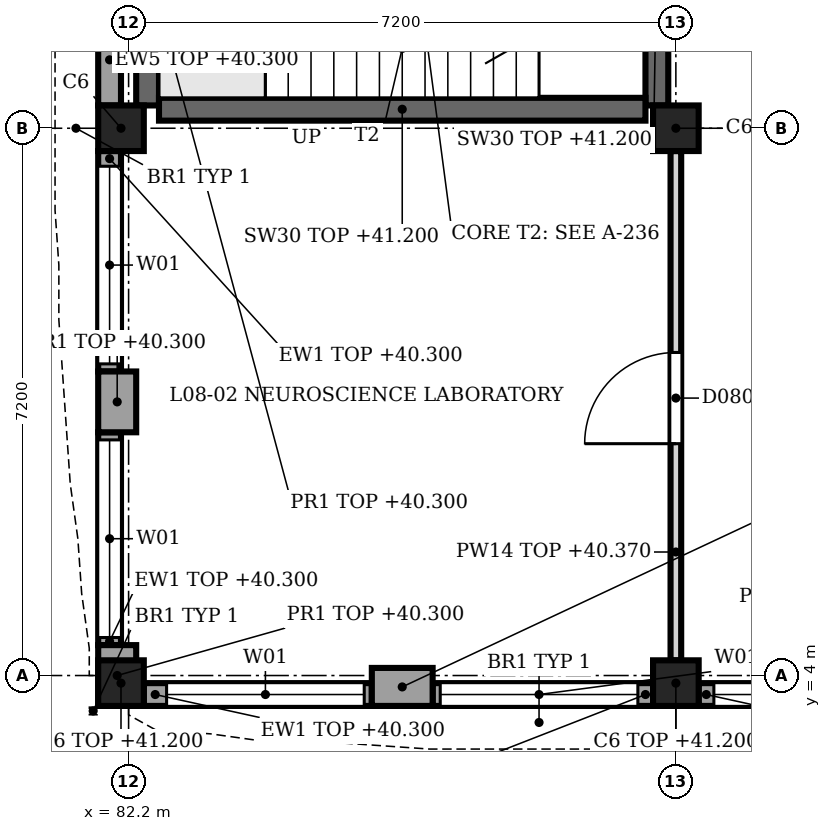
"""IFC4 building model, lengths in metres.
Left out: names, types, materials, properties, quantities, classifications, styles, units other than length and angle.
Written with IfcOpenShell. Run it as: python <this file> out.ifc"""

import sys

from ifc_helpers import new_model, si_unit, direction, frame, frame_2d, origin, origin_2d, place, context, subcontext, project, spatial, rectangle, extrude, element, fill, save


model = new_model("IFC4")
c1 = context("Model", 3, precision=1e-05, world=origin(), true_north=direction((0.0, 1.0)))
c2 = subcontext(c1, "Body", "Model", "MODEL_VIEW")
j1 = project(units=[si_unit("LENGTHUNIT", "METRE"), si_unit("PLANEANGLEUNIT", "RADIAN")], contexts=[c1])
p1 = place(None, origin())
s1 = spatial("IfcSite", under=j1, at=p1, CompositionType="ELEMENT")
p2 = place(p1, origin())
s2 = spatial("IfcBuilding", under=s1, at=p2, CompositionType="ELEMENT")
p3 = place(p2, frame((0.0, 0.0, 36.9)))
s3 = spatial("IfcBuildingStorey", under=s2, at=p3, CompositionType="ELEMENT", Elevation=36.9)
p4 = place(p3, frame((82.1, 3.9, 0.0), z_axis=(0.0, 0.0, 1.0), x_axis=(1.0, 0.0, 0.0)))
e1 = element("IfcColumn", 1, at=p4, inside=s3, PredefinedType="COLUMN", context=c2, shape_type="SweptSolid", body=[
    extrude(rectangle(XDim=0.6, YDim=0.6, at=origin_2d()), origin(), (0.0, 0.0, 1.0), 4.3),
])
p5 = place(p3, frame((82.1, 11.2, 0.0), z_axis=(0.0, 0.0, 1.0), x_axis=(1.0, 0.0, 0.0)))
e2 = element("IfcColumn", 2, at=p5, inside=s3, PredefinedType="COLUMN", context=c2, shape_type="SweptSolid", body=[
    extrude(rectangle(XDim=0.6, YDim=0.6, at=origin_2d()), origin(), (0.0, 0.0, 1.0), 4.5),
])
p6 = place(p3, frame((89.4, 3.9, 0.0), z_axis=(0.0, 0.0, 1.0), x_axis=(1.0, 0.0, 0.0)))
e3 = element("IfcColumn", 3, at=p6, inside=s3, PredefinedType="COLUMN", context=c2, shape_type="SweptSolid", body=[
    extrude(rectangle(XDim=0.6, YDim=0.6, at=origin_2d()), origin(), (0.0, 0.0, 1.0), 4.3),
])
p7 = place(p3, frame((89.4, 11.2, 0.0), z_axis=(0.0, 0.0, 1.0), x_axis=(1.0, 0.0, 0.0)))
e4 = element("IfcColumn", 4, at=p7, inside=s3, PredefinedType="COLUMN", context=c2, shape_type="SweptSolid", body=[
    extrude(rectangle(XDim=0.6, YDim=0.6, at=origin_2d()), origin(), (0.0, 0.0, 1.0), 4.5),
])
p8 = place(p3, frame((82.05, 3.6, 0.0), z_axis=(0.0, 0.0, 1.0), x_axis=(0.0, 1.0, 0.0)))
e5 = element("IfcWall", 5, at=p8, inside=s3, PredefinedType="SOLIDWALL", context=c2, shape_type="SweptSolid", body=[
    extrude(rectangle(XDim=0.8, YDim=0.5, at=frame_2d((0.4, 0.0))), origin(), (0.0, 0.0, 1.0), 3.4),
])
p9 = place(p3, frame((82.05, 7.2, 0.0), z_axis=(0.0, 0.0, 1.0), x_axis=(0.0, 1.0, 0.0)))
e6 = element("IfcWall", 6, at=p9, inside=s3, PredefinedType="SOLIDWALL", context=c2, shape_type="SweptSolid", body=[
    extrude(rectangle(XDim=0.8, YDim=0.5, at=frame_2d((0.4, 0.0))), origin(), (0.0, 0.0, 1.0), 3.4),
])
p10 = place(p3, frame((81.95, 4.4, 0.0), z_axis=(0.0, 0.0, 1.0), x_axis=(0.0, 1.0, 0.0)))
e7 = element("IfcWall", 7, at=p10, inside=s3, PredefinedType="SOLIDWALL", context=c2, shape_type="SweptSolid", body=[
    extrude(rectangle(XDim=2.8, YDim=0.3, at=frame_2d((1.4, 0.0))), origin(), (0.0, 0.0, 1.0), 3.4),
])
p11 = place(p10, frame((0.1, 0.0, 0.9)))
e8 = element("IfcOpeningElement", 8, at=p11, cuts=e7, PredefinedType="OPENING", context=c2, shape_type="SweptSolid", body=[
    extrude(rectangle(XDim=2.6, YDim=2.4, at=frame_2d((1.3, 1.2))), frame((0.0, 0.16, 0.0), z_axis=(0.0, -1.0, 0.0), x_axis=(1.0, 0.0, 0.0)), (0.0, 0.0, 1.0), 0.32),
])
p12 = place(p3, frame((81.95, 8.0, 0.0), z_axis=(0.0, 0.0, 1.0), x_axis=(0.0, 1.0, 0.0)))
e9 = element("IfcWall", 9, at=p12, inside=s3, PredefinedType="SOLIDWALL", context=c2, shape_type="SweptSolid", body=[
    extrude(rectangle(XDim=2.9, YDim=0.3, at=frame_2d((1.45, 0.0))), origin(), (0.0, 0.0, 1.0), 3.4),
])
p13 = place(p12, frame((0.1, 0.0, 0.9)))
e10 = element("IfcOpeningElement", 10, at=p13, cuts=e9, PredefinedType="OPENING", context=c2, shape_type="SweptSolid", body=[
    extrude(rectangle(XDim=2.6, YDim=2.4, at=frame_2d((1.3, 1.2))), frame((0.0, 0.16, 0.0), z_axis=(0.0, -1.0, 0.0), x_axis=(1.0, 0.0, 0.0)), (0.0, 0.0, 1.0), 0.32),
])
p14 = place(p3, frame((81.95, 11.5, 0.0), z_axis=(0.0, 0.0, 1.0), x_axis=(0.0, 1.0, 0.0)))
e11 = element("IfcWall", 11, at=p14, inside=s3, PredefinedType="SOLIDWALL", context=c2, shape_type="SweptSolid", body=[
    extrude(rectangle(XDim=2.9, YDim=0.3, at=frame_2d((1.45, 0.0))), origin(), (0.0, 0.0, 1.0), 3.4),
])
p15 = place(p14, frame((1.2, 0.0, 1.2)))
e12 = element("IfcOpeningElement", 12, at=p15, cuts=e11, PredefinedType="OPENING", context=c2, shape_type="SweptSolid", body=[
    extrude(rectangle(XDim=0.6, YDim=1.8, at=frame_2d((0.3, 0.9))), frame((0.0, 0.16, 0.0), z_axis=(0.0, -1.0, 0.0), x_axis=(1.0, 0.0, 0.0)), (0.0, 0.0, 1.0), 0.32),
])
p16 = place(p3, frame((86.2, 3.85, 0.0), z_axis=(0.0, 0.0, 1.0), x_axis=(-1.0, 0.0, 0.0)))
e13 = element("IfcWall", 13, at=p16, inside=s3, PredefinedType="SOLIDWALL", context=c2, shape_type="SweptSolid", body=[
    extrude(rectangle(XDim=0.8, YDim=0.5, at=frame_2d((0.4, 0.0))), origin(), (0.0, 0.0, 1.0), 3.4),
])
p17 = place(p3, frame((92.6, 3.75, 0.0), z_axis=(0.0, 0.0, 1.0), x_axis=(-1.0, 0.0, 0.0)))
e14 = element("IfcWall", 14, at=p17, inside=s3, PredefinedType="SOLIDWALL", context=c2, shape_type="SweptSolid", body=[
    extrude(rectangle(XDim=2.9, YDim=0.3, at=frame_2d((1.45, 0.0))), origin(), (0.0, 0.0, 1.0), 3.4),
])
p18 = place(p17, frame((0.1, 0.0, 0.9)))
e15 = element("IfcOpeningElement", 15, at=p18, cuts=e14, PredefinedType="OPENING", context=c2, shape_type="SweptSolid", body=[
    extrude(rectangle(XDim=2.6, YDim=2.4, at=frame_2d((1.3, 1.2))), frame((0.0, 0.16, 0.0), z_axis=(0.0, -1.0, 0.0), x_axis=(1.0, 0.0, 0.0)), (0.0, 0.0, 1.0), 0.32),
])
p19 = place(p3, frame((89.1, 3.75, 0.0), z_axis=(0.0, 0.0, 1.0), x_axis=(-1.0, 0.0, 0.0)))
e16 = element("IfcWall", 16, at=p19, inside=s3, PredefinedType="SOLIDWALL", context=c2, shape_type="SweptSolid", body=[
    extrude(rectangle(XDim=2.9, YDim=0.3, at=frame_2d((1.45, 0.0))), origin(), (0.0, 0.0, 1.0), 3.4),
])
p20 = place(p19, frame((0.2, 0.0, 0.9)))
e17 = element("IfcOpeningElement", 17, at=p20, cuts=e16, PredefinedType="OPENING", context=c2, shape_type="SweptSolid", body=[
    extrude(rectangle(XDim=2.6, YDim=2.4, at=frame_2d((1.3, 1.2))), frame((0.0, 0.16, 0.0), z_axis=(0.0, -1.0, 0.0), x_axis=(1.0, 0.0, 0.0)), (0.0, 0.0, 1.0), 0.32),
])
p21 = place(p3, frame((85.4, 3.75, 0.0), z_axis=(0.0, 0.0, 1.0), x_axis=(-1.0, 0.0, 0.0)))
e18 = element("IfcWall", 18, at=p21, inside=s3, PredefinedType="SOLIDWALL", context=c2, shape_type="SweptSolid", body=[
    extrude(rectangle(XDim=3.0, YDim=0.3, at=frame_2d((1.5, 0.0))), origin(), (0.0, 0.0, 1.0), 3.4),
])
p22 = place(p21, frame((0.1, 0.0, 0.9)))
e19 = element("IfcOpeningElement", 19, at=p22, cuts=e18, PredefinedType="OPENING", context=c2, shape_type="SweptSolid", body=[
    extrude(rectangle(XDim=2.6, YDim=2.4, at=frame_2d((1.3, 1.2))), frame((0.0, 0.16, 0.0), z_axis=(0.0, -1.0, 0.0), x_axis=(1.0, 0.0, 0.0)), (0.0, 0.0, 1.0), 0.32),
])
p23 = place(p3, frame((89.15, 11.5, 0.0), z_axis=(0.0, 0.0, 1.0), x_axis=(0.0, 1.0, 0.0)))
e20 = element("IfcWall", 20, at=p23, inside=s3, PredefinedType="SHEAR", context=c2, shape_type="SweptSolid", body=[
    extrude(rectangle(XDim=6.6, YDim=0.3, at=frame_2d((3.3, 0.0))), origin(), (0.0, 0.0, 1.0), 4.3),
])
p24 = place(p23, frame((4.3, 0.0, 0.0)))
e21 = element("IfcOpeningElement", 21, at=p24, cuts=e20, PredefinedType="OPENING", context=c2, shape_type="SweptSolid", body=[
    extrude(rectangle(XDim=1.2, YDim=2.1, at=frame_2d((0.6, 1.05))), frame((0.0, 0.16, 0.0), z_axis=(0.0, -1.0, 0.0), x_axis=(1.0, 0.0, 0.0)), (0.0, 0.0, 1.0), 0.32),
])
p25 = place(p3, frame((82.45, 11.5, 0.0), z_axis=(0.0, 0.0, 1.0), x_axis=(0.0, 1.0, 0.0)))
e22 = element("IfcWall", 22, at=p25, inside=s3, PredefinedType="SHEAR", context=c2, shape_type="SweptSolid", body=[
    extrude(rectangle(XDim=6.6, YDim=0.3, at=frame_2d((3.3, 0.0))), origin(), (0.0, 0.0, 1.0), 4.3),
])
p26 = place(p25, frame((1.2, 0.0, 1.2)))
e23 = element("IfcOpeningElement", 23, at=p26, cuts=e22, PredefinedType="OPENING", context=c2, shape_type="SweptSolid", body=[
    extrude(rectangle(XDim=0.6, YDim=1.8, at=frame_2d((0.3, 0.9))), frame((0.0, 0.16, 0.0), z_axis=(0.0, -1.0, 0.0), x_axis=(1.0, 0.0, 0.0)), (0.0, 0.0, 1.0), 0.32),
])
p27 = place(p3, frame((82.6, 11.45, 0.0), z_axis=(0.0, 0.0, 1.0), x_axis=(1.0, 0.0, 0.0)))
e24 = element("IfcWall", 24, at=p27, inside=s3, PredefinedType="SHEAR", context=c2, shape_type="SweptSolid", body=[
    extrude(rectangle(XDim=6.4, YDim=0.3, at=frame_2d((3.2, 0.0))), origin(), (0.0, 0.0, 1.0), 4.3),
])
p28 = place(p3, frame((89.4, 4.2, 0.0), z_axis=(0.0, 0.0, 1.0), x_axis=(0.0, 1.0, 0.0)))
e25 = element("IfcWall", 25, at=p28, inside=s3, PredefinedType="PARTITIONING", context=c2, shape_type="SweptSolid", body=[
    extrude(rectangle(XDim=6.7, YDim=0.14, at=frame_2d((3.35, 0.0))), origin(), (0.0, 0.0, 1.0), 3.47),
])
p29 = place(p28, frame((2.85, 0.0, 0.0)))
e26 = element("IfcOpeningElement", 26, at=p29, cuts=e25, PredefinedType="OPENING", context=c2, shape_type="SweptSolid", body=[
    extrude(rectangle(XDim=1.2, YDim=2.1, at=frame_2d((0.6, 1.05))), frame((0.0, 0.08, 0.0), z_axis=(0.0, -1.0, 0.0), x_axis=(1.0, 0.0, 0.0)), (0.0, 0.0, 1.0), 0.16),
])
p30 = place(p11, origin())
e27 = element("IfcWindow", 27, at=p30, inside=s3, PartitioningType="SINGLE_PANEL", PredefinedType="WINDOW", context=c2, shape_type="SweptSolid", body=[
    extrude(rectangle(XDim=2.6, YDim=2.4, at=frame_2d((1.3, 1.2))), frame((0.0, 0.03, 0.0), z_axis=(0.0, -1.0, 0.0), x_axis=(1.0, 0.0, 0.0)), (0.0, 0.0, 1.0), 0.06),
])
fill(e8, e27)
p31 = place(p13, origin())
e28 = element("IfcWindow", 28, at=p31, inside=s3, PartitioningType="SINGLE_PANEL", PredefinedType="WINDOW", context=c2, shape_type="SweptSolid", body=[
    extrude(rectangle(XDim=2.6, YDim=2.4, at=frame_2d((1.3, 1.2))), frame((0.0, 0.03, 0.0), z_axis=(0.0, -1.0, 0.0), x_axis=(1.0, 0.0, 0.0)), (0.0, 0.0, 1.0), 0.06),
])
fill(e10, e28)
p32 = place(p18, origin())
e29 = element("IfcWindow", 29, at=p32, inside=s3, PartitioningType="SINGLE_PANEL", PredefinedType="WINDOW", context=c2, shape_type="SweptSolid", body=[
    extrude(rectangle(XDim=2.6, YDim=2.4, at=frame_2d((1.3, 1.2))), frame((0.0, 0.03, 0.0), z_axis=(0.0, -1.0, 0.0), x_axis=(1.0, 0.0, 0.0)), (0.0, 0.0, 1.0), 0.06),
])
fill(e15, e29)
p33 = place(p20, origin())
e30 = element("IfcWindow", 30, at=p33, inside=s3, PartitioningType="SINGLE_PANEL", PredefinedType="WINDOW", context=c2, shape_type="SweptSolid", body=[
    extrude(rectangle(XDim=2.6, YDim=2.4, at=frame_2d((1.3, 1.2))), frame((0.0, 0.03, 0.0), z_axis=(0.0, -1.0, 0.0), x_axis=(1.0, 0.0, 0.0)), (0.0, 0.0, 1.0), 0.06),
])
fill(e17, e30)
p34 = place(p22, origin())
e31 = element("IfcWindow", 31, at=p34, inside=s3, PartitioningType="SINGLE_PANEL", PredefinedType="WINDOW", context=c2, shape_type="SweptSolid", body=[
    extrude(rectangle(XDim=2.6, YDim=2.4, at=frame_2d((1.3, 1.2))), frame((0.0, 0.03, 0.0), z_axis=(0.0, -1.0, 0.0), x_axis=(1.0, 0.0, 0.0)), (0.0, 0.0, 1.0), 0.06),
])
fill(e19, e31)
p35 = place(p29, origin())
e32 = element("IfcDoor", 32, at=p35, inside=s3, OperationType="SINGLE_SWING_RIGHT", PredefinedType="DOOR", context=c2, shape_type="SweptSolid", body=[
    extrude(rectangle(XDim=1.2, YDim=2.1, at=frame_2d((0.6, 1.05))), frame((0.0, 0.025, 0.0), z_axis=(0.0, -1.0, 0.0), x_axis=(1.0, 0.0, 0.0)), (0.0, 0.0, 1.0), 0.05),
])
fill(e26, e32)
save(model, sys.argv[1])
